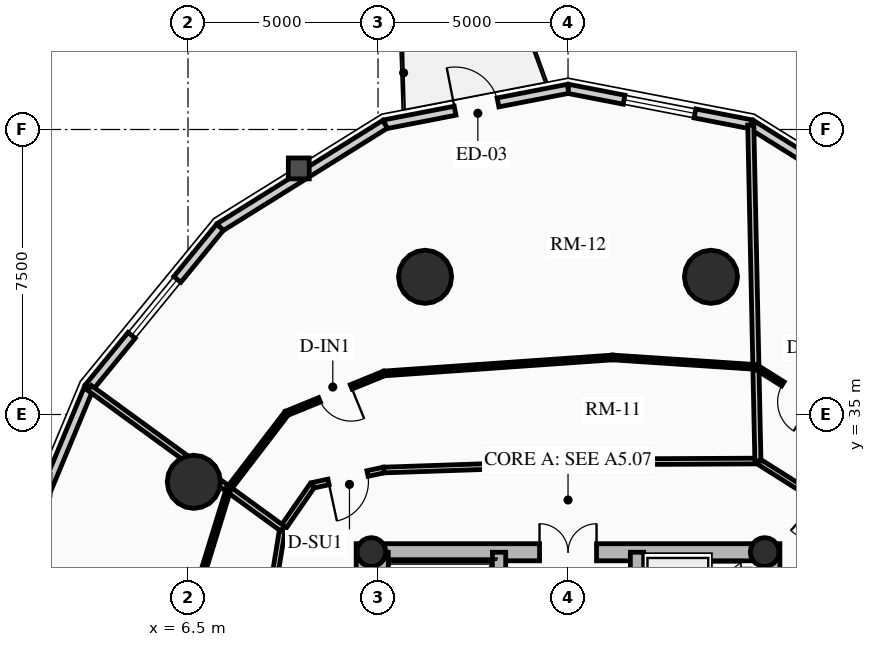
"""IFC4 building model, lengths in metres.
Left out: names, types, materials, properties, quantities, classifications, styles, units other than length and angle.
Written with IfcOpenShell. Run it as: python <this file> out.ifc"""

import sys

from ifc_helpers import new_model, si_unit, direction, frame, frame_2d, origin, origin_2d, place, context, subcontext, project, spatial, rectangle, circle, hollow_circle, extrude, source, transform, mapped, element, fill, save


model = new_model("IFC4")
c1 = context("Model", 3, precision=1e-05, world=origin(), true_north=direction((0.0, 1.0)))
c2 = subcontext(c1, "Body", "Model", "MODEL_VIEW")
j1 = project(units=[si_unit("LENGTHUNIT", "METRE"), si_unit("PLANEANGLEUNIT", "RADIAN")], contexts=[c1])
p1 = place(None, origin())
s1 = spatial("IfcSite", under=j1, at=p1, CompositionType="ELEMENT")
p2 = place(p1, origin())
s2 = spatial("IfcBuilding", under=s1, at=p2, CompositionType="ELEMENT")
p3 = place(p2, frame((0.0, 0.0, 87.61)))
s3 = spatial("IfcBuildingStorey", under=s2, at=p3, CompositionType="ELEMENT", Elevation=87.61)
for number, where, z_axis, x_axis in (
    (1, (11.15, 17.4, 0.0), (0.0, 0.0, 1.0), (0.0, 1.0, 0.0)),
    (2, (21.85, 17.4, 0.0), (0.0, 0.0, 1.0), (0.0, 1.0, 0.0)),
):
    element("IfcWall", number, at=place(p3, frame(where, z_axis=z_axis, x_axis=x_axis)), inside=s3, PredefinedType="SHEAR", context=c2, shape_type="SweptSolid", body=[
        extrude(rectangle(XDim=14.2, YDim=0.45, at=frame_2d((7.1, 0.0))), origin(), (0.0, 0.0, 1.0), 2.91),
    ])
p4 = place(p3, frame((11.15, 31.375, 0.0), z_axis=(0.0, 0.0, 1.0), x_axis=(1.0, 0.0, 0.0)))
e3 = element("IfcWall", 3, at=p4, inside=s3, PredefinedType="SHEAR", context=c2, shape_type="SweptSolid", body=[
    extrude(rectangle(XDim=10.7, YDim=0.45, at=frame_2d((5.35, 0.0))), origin(), (0.0, 0.0, 1.0), 2.91),
])
m1 = source(origin(), c2, "Body", "SweptSolid", [
    extrude(rectangle(XDim=1.5, YDim=2.02, at=frame_2d((0.75, 1.01))), frame((0.0, 0.235, 0.0), z_axis=(0.0, -1.0, 0.0), x_axis=(1.0, 0.0, 0.0)), (0.0, 0.0, 1.0), 0.47),
])
p5 = place(p4, frame((4.6, 0.0, 0.0)))
e4 = element("IfcOpeningElement", 4, at=p5, cuts=e3, PredefinedType="OPENING", context=c2, shape_type="MappedRepresentation", body=[
    mapped(m1, transform((0.0, 0.0, 0.0), x_axis=(1.0, 0.0, 0.0), y_axis=(0.0, 1.0, 0.0), z_axis=(0.0, 0.0, 1.0), scale=1.0)),
])
p6 = place(p3, frame((14.685, 17.625, 0.0), z_axis=(0.0, 0.0, 1.0), x_axis=(0.0, 1.0, 0.0)))
e5 = element("IfcWall", 5, at=p6, inside=s3, PredefinedType="SHEAR", context=c2, shape_type="SweptSolid", body=[
    extrude(rectangle(XDim=13.75, YDim=0.35, at=frame_2d((6.875, 0.0))), origin(), (0.0, 0.0, 1.0), 2.91),
])
m2 = source(origin(), c2, "Body", "SweptSolid", [
    extrude(rectangle(XDim=1.1, YDim=2.015, at=frame_2d((0.55, 1.007))), frame((0.0, 0.185, 0.0), z_axis=(0.0, -1.0, 0.0), x_axis=(1.0, 0.0, 0.0)), (0.0, 0.0, 1.0), 0.37),
])
p7 = place(p6, frame((4.875, 0.0, 0.0)))
e6 = element("IfcOpeningElement", 6, at=p7, cuts=e5, PredefinedType="OPENING", context=c2, shape_type="MappedRepresentation", body=[
    mapped(m2, transform((0.0, 0.0, 0.0), x_axis=(1.0, 0.0, 0.0), y_axis=(0.0, 1.0, 0.0), z_axis=(0.0, 0.0, 1.0), scale=1.0)),
])
m3 = source(origin(), c2, "Body", "SweptSolid", [
    extrude(rectangle(XDim=1.15, YDim=2.02, at=frame_2d((0.575, 1.01))), frame((0.0, 0.185, 0.0), z_axis=(0.0, -1.0, 0.0), x_axis=(1.0, 0.0, 0.0)), (0.0, 0.0, 1.0), 0.37),
])
p8 = place(p6, frame((7.295, 0.0, 0.0)))
e7 = element("IfcOpeningElement", 7, at=p8, cuts=e5, PredefinedType="OPENING", context=c2, shape_type="MappedRepresentation", body=[
    mapped(m3, transform((0.0, 0.0, 0.0), x_axis=(1.0, 0.0, 0.0), y_axis=(0.0, 1.0, 0.0), z_axis=(0.0, 0.0, 1.0), scale=1.0)),
])
p9 = place(p3, frame((18.315, 17.625, 0.0), z_axis=(0.0, 0.0, 1.0), x_axis=(0.0, 1.0, 0.0)))
e8 = element("IfcWall", 8, at=p9, inside=s3, PredefinedType="SHEAR", context=c2, shape_type="SweptSolid", body=[
    extrude(rectangle(XDim=13.75, YDim=0.35, at=frame_2d((6.875, 0.0))), origin(), (0.0, 0.0, 1.0), 2.91),
])
p10 = place(p9, frame((10.0, 0.0, 0.0)))
e9 = element("IfcOpeningElement", 9, at=p10, cuts=e8, PredefinedType="OPENING", context=c2, shape_type="MappedRepresentation", body=[
    mapped(m2, transform((0.0, 0.0, 0.0), x_axis=(1.0, 0.0, 0.0), y_axis=(0.0, 1.0, 0.0), z_axis=(0.0, 0.0, 1.0), scale=1.0)),
])
p11 = place(p9, frame((12.0, 0.0, 0.0)))
e10 = element("IfcOpeningElement", 10, at=p11, cuts=e8, PredefinedType="OPENING", context=c2, shape_type="MappedRepresentation", body=[
    mapped(m2, transform((0.0, 0.0, 0.0), x_axis=(1.0, 0.0, 0.0), y_axis=(0.0, 1.0, 0.0), z_axis=(0.0, 0.0, 1.0), scale=1.0)),
])
p12 = place(p9, frame((5.305, 0.0, 0.0)))
e11 = element("IfcOpeningElement", 11, at=p12, cuts=e8, PredefinedType="OPENING", context=c2, shape_type="MappedRepresentation", body=[
    mapped(m3, transform((0.0, 0.0, 0.0), x_axis=(1.0, 0.0, 0.0), y_axis=(0.0, 1.0, 0.0), z_axis=(0.0, 0.0, 1.0), scale=1.0)),
])
p13 = place(p3, frame((11.595, 24.655, 0.0), z_axis=(0.0, 0.0, 1.0), x_axis=(0.0, 1.0, 0.0)))
e12 = element("IfcWall", 12, at=p13, inside=s3, PredefinedType="SHEAR", context=c2, shape_type="SweptSolid", body=[
    extrude(rectangle(XDim=6.72, YDim=0.35, at=frame_2d((3.36, 0.0))), origin(), (0.0, 0.0, 1.0), 2.91),
])
for number, where, z_axis, x_axis in (
    (13, (11.325, 31.38, 0.0), (0.0, 0.0, 1.0), (1.0, 0.0, 0.0)),
    (14, (21.675, 31.38, 0.0), (0.0, 0.0, 1.0), (1.0, 0.0, 0.0)),
):
    element("IfcColumn", number, at=place(p3, frame(where, z_axis=z_axis, x_axis=x_axis)), inside=s3, PredefinedType="COLUMN", context=c2, shape_type="SweptSolid", body=[
        extrude(hollow_circle(Radius=0.38, WallThickness=0.032, at=origin_2d()), origin(), (0.0, 0.0, 1.0), 2.91),
    ])
for number, where, z_axis, x_axis in (
    (15, (20.261, 38.623, 0.0), (0.0, 0.0, 1.0), (1.0, 0.0, 0.0)),
    (16, (12.739, 38.623, 0.0), (0.0, 0.0, 1.0), (1.0, 0.0, 0.0)),
    (17, (6.653, 33.229, 0.0), (0.0, 0.0, 1.0), (1.0, 0.0, 0.0)),
):
    element("IfcColumn", number, at=place(p3, frame(where, z_axis=z_axis, x_axis=x_axis)), inside=s3, PredefinedType="USERDEFINED", context=c2, shape_type="SweptSolid", body=[
        extrude(circle(Radius=0.7, at=origin_2d()), origin(), (0.0, 0.0, 1.0), 2.91),
    ])
p14 = place(p3, frame((21.315, 42.637, 0.0), z_axis=(0.0, 0.0, 1.0), x_axis=(0.848520380187, -0.529162701263, 0.0)))
e18 = element("IfcWall", 18, at=p14, inside=s3, PredefinedType="SOLIDWALL", context=c2, shape_type="SweptSolid", body=[
    extrude(rectangle(XDim=5.119, YDim=0.24, at=frame_2d((2.56, 0.0))), origin(), (0.0, 0.0, 1.0), 2.179),
])
p15 = place(p3, frame((16.5, 43.57, 0.0), z_axis=(0.0, 0.0, 1.0), x_axis=(0.981723785992, -0.190311344954, 0.0)))
e19 = element("IfcWall", 19, at=p15, inside=s3, PredefinedType="SOLIDWALL", context=c2, shape_type="SweptSolid", body=[
    extrude(rectangle(XDim=4.904, YDim=0.24, at=frame_2d((2.452, 0.0))), origin(), (0.0, 0.0, 1.0), 2.179),
])
m4 = source(origin(), c2, "Body", "SweptSolid", [
    extrude(rectangle(XDim=1.9, YDim=1.35, at=frame_2d((0.95, 0.675))), frame((0.0, 0.13, 0.0), z_axis=(0.0, -1.0, 0.0), x_axis=(1.0, 0.0, 0.0)), (0.0, 0.0, 1.0), 0.26),
])
p16 = place(p15, frame((1.502, 0.0, 0.65)))
e20 = element("IfcOpeningElement", 20, at=p16, cuts=e19, PredefinedType="OPENING", context=c2, shape_type="MappedRepresentation", body=[
    mapped(m4, transform((0.0, 0.0, 0.0), x_axis=(1.0, 0.0, 0.0), y_axis=(0.0, 1.0, 0.0), z_axis=(0.0, 0.0, 1.0), scale=1.0)),
])
p17 = place(p3, frame((11.685, 42.637, 0.0), z_axis=(0.0, 0.0, 1.0), x_axis=(0.981723785992, 0.190311344954, 0.0)))
e21 = element("IfcWall", 21, at=p17, inside=s3, PredefinedType="SOLIDWALL", context=c2, shape_type="SweptSolid", body=[
    extrude(rectangle(XDim=4.904, YDim=0.24, at=frame_2d((2.452, 0.0))), origin(), (0.0, 0.0, 1.0), 2.179),
])
m5 = source(origin(), c2, "Body", "SweptSolid", [
    extrude(rectangle(XDim=1.15, YDim=2.005, at=frame_2d((0.575, 1.002))), frame((0.0, 0.13, 0.0), z_axis=(0.0, -1.0, 0.0), x_axis=(1.0, 0.0, 0.0)), (0.0, 0.0, 1.0), 0.26),
])
p18 = place(p17, frame((1.877, 0.0, 0.0)))
e22 = element("IfcOpeningElement", 22, at=p18, cuts=e21, PredefinedType="OPENING", context=c2, shape_type="MappedRepresentation", body=[
    mapped(m5, transform((0.0, 0.0, 0.0), x_axis=(1.0, 0.0, 0.0), y_axis=(0.0, 1.0, 0.0), z_axis=(0.0, 0.0, 1.0), scale=1.0)),
])
p19 = place(p3, frame((7.342, 39.928, 0.0), z_axis=(0.0, 0.0, 1.0), x_axis=(0.848520380187, 0.529162701263, 0.0)))
e23 = element("IfcWall", 23, at=p19, inside=s3, PredefinedType="SOLIDWALL", context=c2, shape_type="SweptSolid", body=[
    extrude(rectangle(XDim=5.119, YDim=0.24, at=frame_2d((2.56, 0.0))), origin(), (0.0, 0.0, 1.0), 2.179),
])
p20 = place(p3, frame((3.895, 35.709, 0.0), z_axis=(0.0, 0.0, 1.0), x_axis=(0.632700781152, 0.77439635945, 0.0)))
e24 = element("IfcWall", 24, at=p20, inside=s3, PredefinedType="SOLIDWALL", context=c2, shape_type="SweptSolid", body=[
    extrude(rectangle(XDim=5.448, YDim=0.24, at=frame_2d((2.724, 0.0))), origin(), (0.0, 0.0, 1.0), 2.179),
])
p21 = place(p20, frame((1.774, 0.0, 0.65)))
e25 = element("IfcOpeningElement", 25, at=p21, cuts=e24, PredefinedType="OPENING", context=c2, shape_type="MappedRepresentation", body=[
    mapped(m4, transform((0.0, 0.0, 0.0), x_axis=(1.0, 0.0, 0.0), y_axis=(0.0, 1.0, 0.0), z_axis=(0.0, 0.0, 1.0), scale=1.0)),
])
p22 = place(p3, frame((1.682, 30.393, 0.0), z_axis=(0.0, 0.0, 1.0), x_axis=(0.384344417632, 0.923189779317, 0.0)))
e26 = element("IfcWall", 26, at=p22, inside=s3, PredefinedType="SOLIDWALL", context=c2, shape_type="SweptSolid", body=[
    extrude(rectangle(XDim=5.758, YDim=0.24, at=frame_2d((2.879, 0.0))), origin(), (0.0, 0.0, 1.0), 2.179),
])
p23 = place(p3, frame((22.837, 32.929, 0.0), z_axis=(0.0, 0.0, 1.0), x_axis=(-0.84581079329, 0.533482991252, 0.0)))
e27 = element("IfcWall", 27, at=p23, inside=s3, PredefinedType="PARTITIONING", context=c2, shape_type="SweptSolid", body=[
    extrude(rectangle(XDim=1.585, YDim=0.15, at=frame_2d((0.792, 0.0))), origin(), (0.0, 0.0, 1.0), 2.225),
])
p24 = place(p3, frame((21.496, 33.775, 0.0), z_axis=(0.0, 0.0, 1.0), x_axis=(-0.999989544737, -0.004572790979, 0.0)))
e28 = element("IfcWall", 28, at=p24, inside=s3, PredefinedType="PARTITIONING", context=c2, shape_type="SweptSolid", body=[
    extrude(rectangle(XDim=3.364, YDim=0.15, at=frame_2d((1.682, 0.0))), origin(), (0.0, 0.0, 1.0), 2.225),
])
p25 = place(p3, frame((18.133, 33.76, 0.0), z_axis=(0.0, 0.0, 1.0), x_axis=(-0.999419643988, -0.034064280574, 0.0)))
e29 = element("IfcWall", 29, at=p25, inside=s3, PredefinedType="PARTITIONING", context=c2, shape_type="SweptSolid", body=[
    extrude(rectangle(XDim=6.486, YDim=0.15, at=frame_2d((3.243, 0.0))), origin(), (0.0, 0.0, 1.0), 2.225),
])
p26 = place(p3, frame((11.65, 33.539, 0.0), z_axis=(0.0, 0.0, 1.0), x_axis=(-0.977535921581, -0.210768882949, 0.0)))
e30 = element("IfcWall", 30, at=p26, inside=s3, PredefinedType="PARTITIONING", context=c2, shape_type="SweptSolid", body=[
    extrude(rectangle(XDim=1.923, YDim=0.15, at=frame_2d((0.961, 0.0))), origin(), (0.0, 0.0, 1.0), 2.225),
])
m6 = source(origin(), c2, "Body", "SweptSolid", [
    extrude(rectangle(XDim=1.05, YDim=2.015, at=frame_2d((0.525, 1.007))), frame((0.0, 0.085, 0.0), z_axis=(0.0, -1.0, 0.0), x_axis=(1.0, 0.0, 0.0)), (0.0, 0.0, 1.0), 0.17),
])
p27 = place(p26, frame((0.436, 0.0, 0.0)))
e31 = element("IfcOpeningElement", 31, at=p27, cuts=e30, PredefinedType="OPENING", context=c2, shape_type="MappedRepresentation", body=[
    mapped(m6, transform((0.0, 0.0, 0.0), x_axis=(1.0, 0.0, 0.0), y_axis=(0.0, 1.0, 0.0), z_axis=(0.0, 0.0, 1.0), scale=1.0)),
])
p28 = place(p3, frame((9.771, 33.133, 0.0), z_axis=(0.0, 0.0, 1.0), x_axis=(-0.568464531016, -0.822707771312, 0.0)))
e32 = element("IfcWall", 32, at=p28, inside=s3, PredefinedType="PARTITIONING", context=c2, shape_type="SweptSolid", body=[
    extrude(rectangle(XDim=1.38, YDim=0.15, at=frame_2d((0.69, 0.0))), origin(), (0.0, 0.0, 1.0), 2.225),
])
p29 = place(p3, frame((8.986, 31.998, 0.0), z_axis=(0.0, 0.0, 1.0), x_axis=(-0.158992972351, -0.98727971454, 0.0)))
e33 = element("IfcWall", 33, at=p29, inside=s3, PredefinedType="PARTITIONING", context=c2, shape_type="SweptSolid", body=[
    extrude(rectangle(XDim=1.539, YDim=0.15, at=frame_2d((0.769, 0.0))), origin(), (0.0, 0.0, 1.0), 2.225),
])
p30 = place(p3, frame((21.496, 33.775, 0.0), z_axis=(0.0, 0.0, 1.0), x_axis=(-0.021226580265, 0.999774690763, 0.0)))
e34 = element("IfcWall", 34, at=p30, inside=s3, PredefinedType="PARTITIONING", context=c2, shape_type="SweptSolid", body=[
    extrude(rectangle(XDim=8.845, YDim=0.16, at=frame_2d((4.422, 0.0))), origin(), (0.0, 0.0, 1.0), 2.179),
])
p31 = place(p3, frame((8.986, 31.998, 0.0), z_axis=(0.0, 0.0, 1.0), x_axis=(-0.808130498411, 0.589003478375, 0.0)))
e35 = element("IfcWall", 35, at=p31, inside=s3, PredefinedType="PARTITIONING", context=c2, shape_type="SweptSolid", body=[
    extrude(rectangle(XDim=6.281, YDim=0.16, at=frame_2d((3.14, 0.0))), origin(), (0.0, 0.0, 1.0), 2.179),
])
p32 = place(p3, frame((23.624, 34.884, 0.0), z_axis=(0.0, 0.0, 1.0), x_axis=(-0.84728326465, 0.531141289531, 0.0)))
e36 = element("IfcWall", 36, at=p32, inside=s3, PredefinedType="PARTITIONING", context=c2, shape_type="SweptSolid", body=[
    extrude(rectangle(XDim=2.573, YDim=0.125, at=frame_2d((1.287, 0.0))), origin(), (0.0, 0.0, 1.0), 2.225),
])
m7 = source(origin(), c2, "Body", "SweptSolid", [
    extrude(rectangle(XDim=0.9, YDim=2.005, at=frame_2d((0.45, 1.002))), frame((0.0, 0.073, 0.0), z_axis=(0.0, -1.0, 0.0), x_axis=(1.0, 0.0, 0.0)), (0.0, 0.0, 1.0), 0.145),
])
p33 = place(p32, frame((0.836, 0.0, 0.0)))
e37 = element("IfcOpeningElement", 37, at=p33, cuts=e36, PredefinedType="OPENING", context=c2, shape_type="MappedRepresentation", body=[
    mapped(m7, transform((0.0, 0.0, 0.0), x_axis=(1.0, 0.0, 0.0), y_axis=(0.0, 1.0, 0.0), z_axis=(0.0, 0.0, 1.0), scale=1.0)),
])
p34 = place(p3, frame((21.444, 36.251, 0.0), z_axis=(0.0, 0.0, 1.0), x_axis=(-0.997810544349, 0.066137112017, 0.0)))
e38 = element("IfcWall", 38, at=p34, inside=s3, PredefinedType="PARTITIONING", context=c2, shape_type="SweptSolid", body=[
    extrude(rectangle(XDim=3.776, YDim=0.125, at=frame_2d((1.888, 0.0))), origin(), (0.0, 0.0, 1.0), 2.225),
])
p35 = place(p3, frame((17.676, 36.501, 0.0), z_axis=(0.0, 0.0, 1.0), x_axis=(-0.997570913993, -0.069658248298, 0.0)))
e39 = element("IfcWall", 39, at=p35, inside=s3, PredefinedType="PARTITIONING", context=c2, shape_type="SweptSolid", body=[
    extrude(rectangle(XDim=6.028, YDim=0.125, at=frame_2d((3.014, 0.0))), origin(), (0.0, 0.0, 1.0), 2.225),
])
p36 = place(p3, frame((11.662, 36.081, 0.0), z_axis=(0.0, 0.0, 1.0), x_axis=(-0.925664670378, -0.378344972234, 0.0)))
e40 = element("IfcWall", 40, at=p36, inside=s3, PredefinedType="PARTITIONING", context=c2, shape_type="SweptSolid", body=[
    extrude(rectangle(XDim=2.774, YDim=0.125, at=frame_2d((1.387, 0.0))), origin(), (0.0, 0.0, 1.0), 2.225),
])
p37 = place(p36, frame((0.937, 0.0, 0.0)))
e41 = element("IfcOpeningElement", 41, at=p37, cuts=e40, PredefinedType="OPENING", context=c2, shape_type="MappedRepresentation", body=[
    mapped(m7, transform((0.0, 0.0, 0.0), x_axis=(1.0, 0.0, 0.0), y_axis=(0.0, 1.0, 0.0), z_axis=(0.0, 0.0, 1.0), scale=1.0)),
])
p38 = place(p3, frame((9.094, 35.031, 0.0), z_axis=(0.0, 0.0, 1.0), x_axis=(-0.607813927368, -0.794079485755, 0.0)))
e42 = element("IfcWall", 42, at=p38, inside=s3, PredefinedType="PARTITIONING", context=c2, shape_type="SweptSolid", body=[
    extrude(rectangle(XDim=2.515, YDim=0.125, at=frame_2d((1.258, 0.0))), origin(), (0.0, 0.0, 1.0), 2.655),
])
p39 = place(p3, frame((7.565, 33.034, 0.0), z_axis=(0.0, 0.0, 1.0), x_axis=(-0.294365365095, -0.955692958974, 0.0)))
e43 = element("IfcWall", 43, at=p39, inside=s3, PredefinedType="PARTITIONING", context=c2, shape_type="SweptSolid", body=[
    extrude(rectangle(XDim=2.7, YDim=0.125, at=frame_2d((1.35, 0.0))), origin(), (0.0, 0.0, 1.0), 2.225),
])
m8 = source(origin(), c2, "Body", "SweptSolid", [
    extrude(rectangle(XDim=1.9, YDim=1.35, at=frame_2d((0.95, 0.675))), frame((0.0, 0.03, 0.0), z_axis=(0.0, -1.0, 0.0), x_axis=(1.0, 0.0, 0.0)), (0.0, 0.0, 1.0), 0.06),
])
p40 = place(p16, origin())
e44 = element("IfcWindow", 44, at=p40, inside=s3, PartitioningType="DOUBLE_PANEL_VERTICAL", PredefinedType="WINDOW", context=c2, shape_type="MappedRepresentation", body=[
    mapped(m8, transform((0.0, 0.0, 0.0), x_axis=(1.0, 0.0, 0.0), y_axis=(0.0, 1.0, 0.0), z_axis=(0.0, 0.0, 1.0), scale=1.0)),
])
fill(e20, e44)
m9 = source(origin(), c2, "Body", "SweptSolid", [
    extrude(rectangle(XDim=1.15, YDim=2.005, at=frame_2d((0.575, 1.002))), frame((0.0, 0.025, 0.0), z_axis=(0.0, -1.0, 0.0), x_axis=(1.0, 0.0, 0.0)), (0.0, 0.0, 1.0), 0.05),
])
p41 = place(p18, origin())
e45 = element("IfcDoor", 45, at=p41, inside=s3, OperationType="SINGLE_SWING_LEFT", PredefinedType="DOOR", context=c2, shape_type="MappedRepresentation", body=[
    mapped(m9, transform((0.0, 0.0, 0.0), x_axis=(1.0, 0.0, 0.0), y_axis=(0.0, 1.0, 0.0), z_axis=(0.0, 0.0, 1.0), scale=1.0)),
])
fill(e22, e45)
p42 = place(p21, origin())
e46 = element("IfcWindow", 46, at=p42, inside=s3, PartitioningType="DOUBLE_PANEL_VERTICAL", PredefinedType="WINDOW", context=c2, shape_type="MappedRepresentation", body=[
    mapped(m8, transform((0.0, 0.0, 0.0), x_axis=(1.0, 0.0, 0.0), y_axis=(0.0, 1.0, 0.0), z_axis=(0.0, 0.0, 1.0), scale=1.0)),
])
fill(e25, e46)
m10 = source(origin(), c2, "Body", "SweptSolid", [
    extrude(rectangle(XDim=1.5, YDim=2.02, at=frame_2d((0.75, 1.01))), frame((0.0, 0.025, 0.0), z_axis=(0.0, -1.0, 0.0), x_axis=(1.0, 0.0, 0.0)), (0.0, 0.0, 1.0), 0.05),
])
p43 = place(p5, origin())
e47 = element("IfcDoor", 47, at=p43, inside=s3, OperationType="DOUBLE_DOOR_SINGLE_SWING", PredefinedType="DOOR", context=c2, shape_type="MappedRepresentation", body=[
    mapped(m10, transform((0.0, 0.0, 0.0), x_axis=(1.0, 0.0, 0.0), y_axis=(0.0, 1.0, 0.0), z_axis=(0.0, 0.0, 1.0), scale=1.0)),
])
fill(e4, e47)
m11 = source(origin(), c2, "Body", "SweptSolid", [
    extrude(rectangle(XDim=0.9, YDim=2.005, at=frame_2d((0.45, 1.002))), frame((0.0, 0.025, 0.0), z_axis=(0.0, -1.0, 0.0), x_axis=(1.0, 0.0, 0.0)), (0.0, 0.0, 1.0), 0.05),
])
p44 = place(p33, origin())
e48 = element("IfcDoor", 48, at=p44, inside=s3, OperationType="SINGLE_SWING_LEFT", PredefinedType="DOOR", context=c2, shape_type="MappedRepresentation", body=[
    mapped(m11, transform((0.0, 0.0, 0.0), x_axis=(1.0, 0.0, 0.0), y_axis=(0.0, 1.0, 0.0), z_axis=(0.0, 0.0, 1.0), scale=1.0)),
])
fill(e37, e48)
m12 = source(origin(), c2, "Body", "SweptSolid", [
    extrude(rectangle(XDim=1.05, YDim=2.015, at=frame_2d((0.525, 1.007))), frame((0.0, 0.025, 0.0), z_axis=(0.0, -1.0, 0.0), x_axis=(1.0, 0.0, 0.0)), (0.0, 0.0, 1.0), 0.05),
])
p45 = place(p27, origin())
e49 = element("IfcDoor", 49, at=p45, inside=s3, OperationType="SINGLE_SWING_RIGHT", PredefinedType="DOOR", context=c2, shape_type="MappedRepresentation", body=[
    mapped(m12, transform((0.0, 0.0, 0.0), x_axis=(1.0, 0.0, 0.0), y_axis=(0.0, 1.0, 0.0), z_axis=(0.0, 0.0, 1.0), scale=1.0)),
])
fill(e31, e49)
p46 = place(p37, origin())
e50 = element("IfcDoor", 50, at=p46, inside=s3, OperationType="SINGLE_SWING_LEFT", PredefinedType="DOOR", context=c2, shape_type="MappedRepresentation", body=[
    mapped(m11, transform((0.0, 0.0, 0.0), x_axis=(1.0, 0.0, 0.0), y_axis=(0.0, 1.0, 0.0), z_axis=(0.0, 0.0, 1.0), scale=1.0)),
])
fill(e41, e50)
save(model, sys.argv[1])
